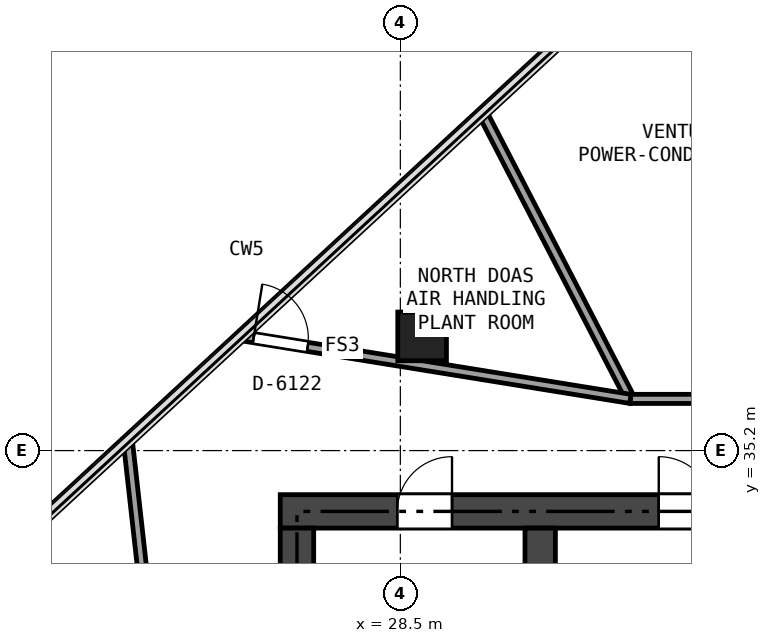
"""IFC4 building model, lengths in metres.
Left out: names, types, materials, properties, quantities, classifications, styles, units other than length and angle.
Written with IfcOpenShell. Run it as: python <this file> out.ifc"""

import sys

from ifc_helpers import new_model, si_unit, direction, frame, frame_2d, origin, origin_2d, place, context, subcontext, project, spatial, rectangle, extrude, element, fill, save


model = new_model("IFC4")
c1 = context("Model", 3, precision=1e-05, world=origin(), true_north=direction((0.0, 1.0)))
c2 = subcontext(c1, "Body", "Model", "MODEL_VIEW")
j1 = project(units=[si_unit("LENGTHUNIT", "METRE"), si_unit("PLANEANGLEUNIT", "RADIAN")], contexts=[c1])
p1 = place(None, origin())
s1 = spatial("IfcSite", under=j1, at=p1, CompositionType="ELEMENT")
p2 = place(p1, origin())
s2 = spatial("IfcBuilding", under=s1, at=p2, CompositionType="ELEMENT")
p3 = place(p2, frame((0.0, 0.0, 228.3)))
s3 = spatial("IfcBuildingStorey", under=s2, at=p3, CompositionType="ELEMENT", Elevation=228.3)
p4 = place(p3, frame((26.525, 34.2, 0.0), z_axis=(0.0, 0.0, 1.0), x_axis=(1.0, 0.0, 0.0)))
e1 = element("IfcWall", 1, at=p4, inside=s3, PredefinedType="SHEAR", context=c2, shape_type="SweptSolid", body=[
    extrude(rectangle(XDim=21.35, YDim=0.55, at=frame_2d((10.675, 0.0))), origin(), (0.0, 0.0, 1.0), 3.24),
])
p5 = place(p4, frame((9.675, 0.0, 0.0)))
e2 = element("IfcOpeningElement", 2, at=p5, cuts=e1, PredefinedType="OPENING", context=c2, shape_type="SweptSolid", body=[
    extrude(rectangle(XDim=1.1, YDim=2.15, at=frame_2d((0.55, 1.075))), frame((0.0, 0.285, 0.0), z_axis=(0.0, -1.0, 0.0), x_axis=(1.0, 0.0, 0.0)), (0.0, 0.0, 1.0), 0.57),
])
p6 = place(p4, frame((1.925, 0.0, 0.0)))
e3 = element("IfcOpeningElement", 3, at=p6, cuts=e1, PredefinedType="OPENING", context=c2, shape_type="SweptSolid", body=[
    extrude(rectangle(XDim=0.9, YDim=2.1, at=frame_2d((0.45, 1.05))), frame((0.0, 0.285, 0.0), z_axis=(0.0, -1.0, 0.0), x_axis=(1.0, 0.0, 0.0)), (0.0, 0.0, 1.0), 0.57),
])
p7 = place(p4, frame((6.225, 0.0, 0.0)))
e4 = element("IfcOpeningElement", 4, at=p7, cuts=e1, PredefinedType="OPENING", context=c2, shape_type="SweptSolid", body=[
    extrude(rectangle(XDim=0.9, YDim=2.1, at=frame_2d((0.45, 1.05))), frame((0.0, 0.285, 0.0), z_axis=(0.0, -1.0, 0.0), x_axis=(1.0, 0.0, 0.0)), (0.0, 0.0, 1.0), 0.57),
])
p8 = place(p3, frame((26.8, 18.875, 0.0), z_axis=(0.0, 0.0, 1.0), x_axis=(0.0, 1.0, 0.0)))
e5 = element("IfcWall", 5, at=p8, inside=s3, PredefinedType="SHEAR", context=c2, shape_type="SweptSolid", body=[
    extrude(rectangle(XDim=15.05, YDim=0.55, at=frame_2d((7.525, 0.0))), origin(), (0.0, 0.0, 1.0), 3.24),
])
p9 = place(p3, frame((30.8, 18.875, 0.0), z_axis=(0.0, 0.0, 1.0), x_axis=(0.0, 1.0, 0.0)))
e6 = element("IfcWall", 6, at=p9, inside=s3, PredefinedType="SHEAR", context=c2, shape_type="SweptSolid", body=[
    extrude(rectangle(XDim=15.05, YDim=0.5, at=frame_2d((7.525, 0.0))), origin(), (0.0, 0.0, 1.0), 3.24),
])
p10 = place(p9, frame((6.625, 0.0, 0.0)))
e7 = element("IfcOpeningElement", 7, at=p10, cuts=e6, PredefinedType="OPENING", context=c2, shape_type="SweptSolid", body=[
    extrude(rectangle(XDim=1.1, YDim=2.15, at=frame_2d((0.55, 1.075))), frame((0.0, 0.26, 0.0), z_axis=(0.0, -1.0, 0.0), x_axis=(1.0, 0.0, 0.0)), (0.0, 0.0, 1.0), 0.52),
])
p11 = place(p9, frame((8.425, 0.0, 0.0)))
e8 = element("IfcOpeningElement", 8, at=p11, cuts=e6, PredefinedType="OPENING", context=c2, shape_type="SweptSolid", body=[
    extrude(rectangle(XDim=0.9, YDim=2.1, at=frame_2d((0.45, 1.05))), frame((0.0, 0.26, 0.0), z_axis=(0.0, -1.0, 0.0), x_axis=(1.0, 0.0, 0.0)), (0.0, 0.0, 1.0), 0.52),
])
p12 = place(p3, frame((28.858, 37.078, -0.345), z_axis=(0.0, 0.0, 1.0), x_axis=(1.0, 0.0, 0.0)))
e9 = element("IfcColumn", 9, at=p12, inside=s3, PredefinedType="COLUMN", context=c2, shape_type="SweptSolid", body=[
    extrude(rectangle(XDim=0.8, YDim=0.8, at=origin_2d()), origin(), (0.0, 0.0, 1.0), 3.585),
])
p13 = place(p3, frame((29.839, 40.775, 0.0), z_axis=(0.0, 0.0, 1.0), x_axis=(0.459416676004, -0.888220872199, 0.0)))
e10 = element("IfcWall", 10, at=p13, inside=s3, PredefinedType="PARTITIONING", context=c2, shape_type="SweptSolid", body=[
    extrude(rectangle(XDim=5.319, YDim=0.15, at=frame_2d((2.66, 0.0))), origin(), (0.0, 0.0, 1.0), 2.765),
])
p14 = place(p3, frame((32.283, 36.05, 0.0), z_axis=(0.0, 0.0, 1.0), x_axis=(1.0, 0.0, 0.0)))
e11 = element("IfcWall", 11, at=p14, inside=s3, PredefinedType="PARTITIONING", context=c2, shape_type="SweptSolid", body=[
    extrude(rectangle(XDim=5.423, YDim=0.15, at=frame_2d((2.711, 0.0))), origin(), (0.0, 0.0, 1.0), 2.689),
])
p15 = place(p14, frame((2.262, 0.0, 0.0)))
e12 = element("IfcOpeningElement", 12, at=p15, cuts=e11, PredefinedType="OPENING", context=c2, shape_type="SweptSolid", body=[
    extrude(rectangle(XDim=0.9, YDim=2.0, at=frame_2d((0.45, 1.0))), frame((0.0, 0.085, 0.0), z_axis=(0.0, -1.0, 0.0), x_axis=(1.0, 0.0, 0.0)), (0.0, 0.0, 1.0), 0.17),
])
p16 = place(p3, frame((25.85, 37.087, 0.0), z_axis=(0.0, 0.0, 1.0), x_axis=(0.987257835499, -0.159128772529, 0.0)))
e13 = element("IfcWall", 13, at=p16, inside=s3, PredefinedType="PARTITIONING", context=c2, shape_type="SweptSolid", body=[
    extrude(rectangle(XDim=6.516, YDim=0.15, at=frame_2d((3.258, 0.0))), origin(), (0.0, 0.0, 1.0), 2.689),
])
p17 = place(p16, frame((0.24, 0.0, 0.0)))
e14 = element("IfcOpeningElement", 14, at=p17, cuts=e13, PredefinedType="OPENING", context=c2, shape_type="SweptSolid", body=[
    extrude(rectangle(XDim=0.9, YDim=2.0, at=frame_2d((0.45, 1.0))), frame((0.0, 0.085, 0.0), z_axis=(0.0, -1.0, 0.0), x_axis=(1.0, 0.0, 0.0)), (0.0, 0.0, 1.0), 0.17),
])
p18 = place(p3, frame((24.95, 27.042, 0.0), z_axis=(0.0, 0.0, 1.0), x_axis=(-0.111362366536, 0.99377986663, 0.0)))
e15 = element("IfcWall", 15, at=p18, inside=s3, PredefinedType="PARTITIONING", context=c2, shape_type="SweptSolid", body=[
    extrude(rectangle(XDim=8.405, YDim=0.15, at=frame_2d((4.203, 0.0))), origin(), (0.0, 0.0, 1.0), 2.689),
])
p19 = place(p18, frame((3.753, 0.0, 0.0)))
e16 = element("IfcOpeningElement", 16, at=p19, cuts=e15, PredefinedType="OPENING", context=c2, shape_type="SweptSolid", body=[
    extrude(rectangle(XDim=0.9, YDim=2.0, at=frame_2d((0.45, 1.0))), frame((0.0, 0.085, 0.0), z_axis=(0.0, -1.0, 0.0), x_axis=(1.0, 0.0, 0.0)), (0.0, 0.0, 1.0), 0.17),
])
p20 = place(p6, origin())
e17 = element("IfcDoor", 17, at=p20, inside=s3, OperationType="SINGLE_SWING_RIGHT", PredefinedType="DOOR", context=c2, shape_type="SweptSolid", body=[
    extrude(rectangle(XDim=0.9, YDim=2.1, at=frame_2d((0.45, 1.05))), frame((0.0, 0.025, 0.0), z_axis=(0.0, -1.0, 0.0), x_axis=(1.0, 0.0, 0.0)), (0.0, 0.0, 1.0), 0.05),
])
fill(e3, e17)
p21 = place(p7, origin())
e18 = element("IfcDoor", 18, at=p21, inside=s3, OperationType="SINGLE_SWING_LEFT", PredefinedType="DOOR", context=c2, shape_type="SweptSolid", body=[
    extrude(rectangle(XDim=0.9, YDim=2.1, at=frame_2d((0.45, 1.05))), frame((0.0, 0.025, 0.0), z_axis=(0.0, -1.0, 0.0), x_axis=(1.0, 0.0, 0.0)), (0.0, 0.0, 1.0), 0.05),
])
fill(e4, e18)
p22 = place(p17, origin())
e19 = element("IfcDoor", 19, at=p22, inside=s3, OperationType="SINGLE_SWING_LEFT", PredefinedType="DOOR", context=c2, shape_type="SweptSolid", body=[
    extrude(rectangle(XDim=0.9, YDim=2.0, at=frame_2d((0.45, 1.0))), frame((0.0, 0.025, 0.0), z_axis=(0.0, -1.0, 0.0), x_axis=(1.0, 0.0, 0.0)), (0.0, 0.0, 1.0), 0.05),
])
fill(e14, e19)
save(model, sys.argv[1])
